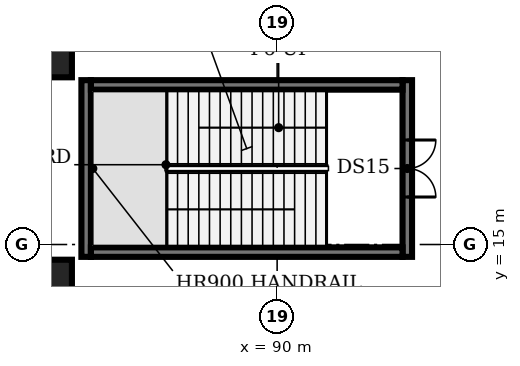
"""IFC4 building model, lengths in metres.
Left out: names, types, materials, properties, quantities, classifications, styles, units other than length and angle.
Written with IfcOpenShell. Run it as: python <this file> out.ifc"""

import sys

from ifc_helpers import new_model, si_unit, direction, frame, frame_2d, origin, origin_2d, place, context, subcontext, project, spatial, rectangle, extrude, element, fill, save


model = new_model("IFC4")
c1 = context("Model", 3, precision=1e-05, world=origin(), true_north=direction((0.0, 1.0)))
c2 = subcontext(c1, "Body", "Model", "MODEL_VIEW")
j1 = project(units=[si_unit("LENGTHUNIT", "METRE"), si_unit("PLANEANGLEUNIT", "RADIAN")], contexts=[c1])
p1 = place(None, origin())
s1 = spatial("IfcSite", under=j1, at=p1, CompositionType="ELEMENT")
p2 = place(p1, origin())
s2 = spatial("IfcBuilding", under=s1, at=p2, CompositionType="ELEMENT")
p3 = place(p2, frame((0.0, 0.0, -6.0)))
s3 = spatial("IfcBuildingStorey", under=s2, at=p3, CompositionType="ELEMENT", Elevation=-6.0)
for number, where, z_axis, x_axis in (
    (1, (84.0, 14.0, -0.3), (0.0, 0.0, 1.0), (1.0, 0.0, 0.0)),
    (2, (84.0, 20.0, -0.3), (0.0, 0.0, 1.0), (1.0, 0.0, 0.0)),
):
    element("IfcColumn", number, at=place(p3, frame(where, z_axis=z_axis, x_axis=x_axis)), inside=s3, PredefinedType="COLUMN", context=c2, shape_type="SweptSolid", body=[
        extrude(rectangle(XDim=1.2, YDim=1.2, at=origin_2d()), origin(), (0.0, 0.0, 1.0), 5.95),
    ])
p4 = place(p3, frame((84.975, 14.675, 0.0), z_axis=(0.0, 0.0, 1.0), x_axis=(0.0, 1.0, 0.0)))
e3 = element("IfcWall", 3, at=p4, inside=s3, PredefinedType="SHEAR", context=c2, shape_type="SweptSolid", body=[
    extrude(rectangle(XDim=4.65, YDim=0.25, at=frame_2d((2.325, 0.0))), origin(), (0.0, 0.0, 1.0), 5.65),
])
p5 = place(p3, frame((93.425, 19.325, 0.0), z_axis=(0.0, 0.0, 1.0), x_axis=(0.0, -1.0, 0.0)))
e4 = element("IfcWall", 4, at=p5, inside=s3, PredefinedType="SHEAR", context=c2, shape_type="SweptSolid", body=[
    extrude(rectangle(XDim=4.65, YDim=0.25, at=frame_2d((2.325, 0.0))), origin(), (0.0, 0.0, 1.0), 5.65),
])
p6 = place(p5, frame((1.575, 0.0, 0.0)))
e5 = element("IfcOpeningElement", 5, at=p6, cuts=e4, PredefinedType="OPENING", context=c2, shape_type="SweptSolid", body=[
    extrude(rectangle(XDim=1.5, YDim=2.1, at=frame_2d((0.75, 1.05))), frame((0.0, 0.135, 0.0), z_axis=(0.0, -1.0, 0.0), x_axis=(1.0, 0.0, 0.0)), (0.0, 0.0, 1.0), 0.27),
])
for number, where, z_axis, x_axis in (
    (6, (85.1, 14.8, 0.0), (0.0, 0.0, 1.0), (1.0, 0.0, 0.0)),
    (7, (85.1, 19.2, 0.0), (0.0, 0.0, 1.0), (1.0, 0.0, 0.0)),
):
    element("IfcWall", number, at=place(p3, frame(where, z_axis=z_axis, x_axis=x_axis)), inside=s3, PredefinedType="SHEAR", context=c2, shape_type="SweptSolid", body=[
        extrude(rectangle(XDim=8.2, YDim=0.25, at=frame_2d((4.1, 0.0))), origin(), (0.0, 0.0, 1.0), 5.65),
    ])
p7 = place(p6, origin())
e8 = element("IfcDoor", 8, at=p7, inside=s3, OperationType="DOUBLE_DOOR_SINGLE_SWING", PredefinedType="DOOR", context=c2, shape_type="SweptSolid", body=[
    extrude(rectangle(XDim=1.5, YDim=2.1, at=frame_2d((0.75, 1.05))), frame((0.0, 0.025, 0.0), z_axis=(0.0, -1.0, 0.0), x_axis=(1.0, 0.0, 0.0)), (0.0, 0.0, 1.0), 0.05),
])
fill(e5, e8)
save(model, sys.argv[1])
